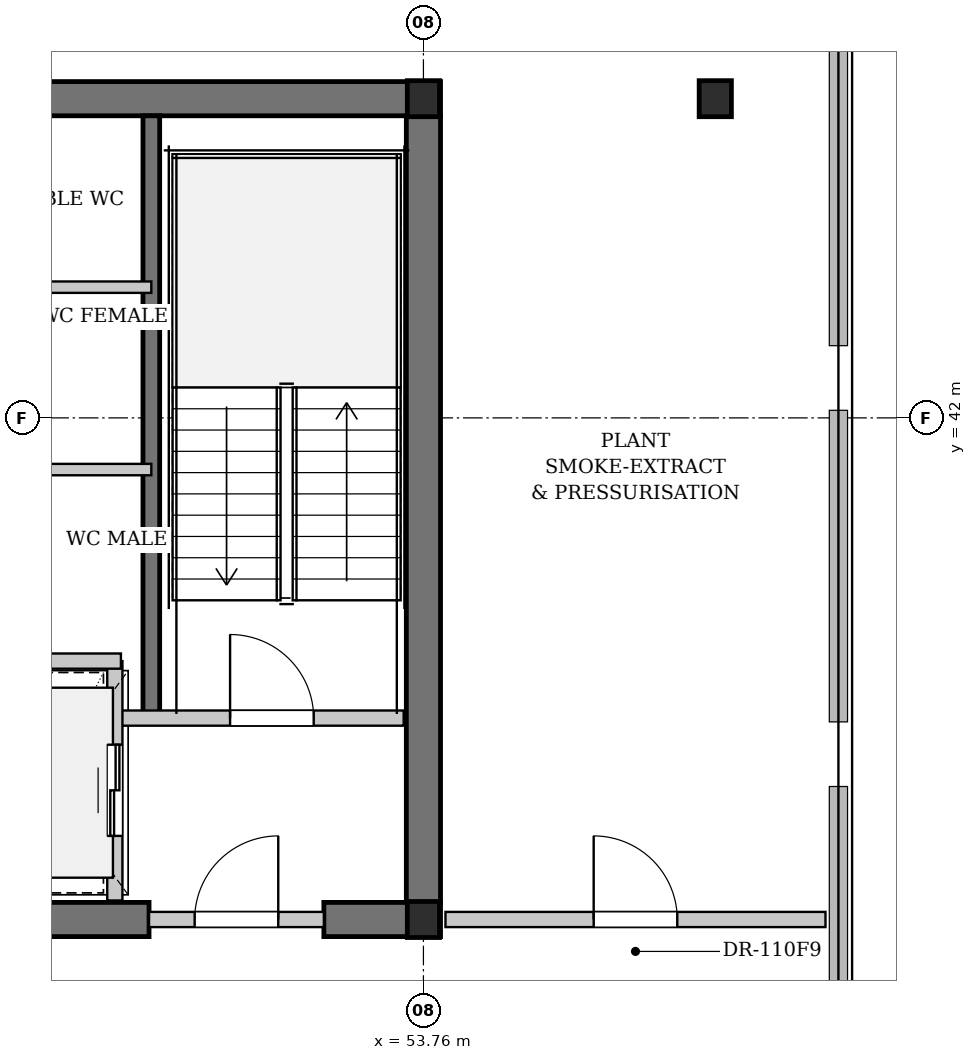
"""IFC4 building model, lengths in metres.
Left out: names, types, materials, properties, quantities, classifications, styles, units other than length and angle.
Written with IfcOpenShell. Run it as: python <this file> out.ifc"""

import sys

from ifc_helpers import new_model, si_unit, direction, frame, frame_2d, origin, origin_2d, place, context, subcontext, project, spatial, rectangle, i_section, extrude, element, fill, save


model = new_model("IFC4")
c1 = context("Model", 3, precision=1e-05, world=origin(), true_north=direction((0.0, 1.0)))
c2 = subcontext(c1, "Body", "Model", "MODEL_VIEW")
j1 = project(units=[si_unit("LENGTHUNIT", "METRE"), si_unit("PLANEANGLEUNIT", "RADIAN")], contexts=[c1])
p1 = place(None, origin())
s1 = spatial("IfcSite", under=j1, at=p1, CompositionType="ELEMENT")
p2 = place(p1, origin())
s2 = spatial("IfcBuilding", under=s1, at=p2, CompositionType="ELEMENT")
p3 = place(p2, frame((0.0, 0.0, 145.1)))
s3 = spatial("IfcBuildingStorey", under=s2, at=p3, CompositionType="ELEMENT", Elevation=145.1)
p4 = place(p3, frame((22.815, 46.2, 0.0), z_axis=(0.0, 0.0, 1.0), x_axis=(1.0, 0.0, 0.0)))
e1 = element("IfcWall", 1, at=p4, inside=s3, PredefinedType="SHEAR", context=c2, shape_type="SweptSolid", body=[
    extrude(rectangle(XDim=31.17, YDim=0.45, at=frame_2d((15.585, 0.0))), origin(), (0.0, 0.0, 1.0), 3.48),
])
p5 = place(p3, frame((42.1, 35.4, 0.0), z_axis=(0.0, 0.0, 1.0), x_axis=(1.0, 0.0, 0.0)))
e2 = element("IfcWall", 2, at=p5, inside=s3, PredefinedType="SHEAR", context=c2, shape_type="SweptSolid", body=[
    extrude(rectangle(XDim=8.05, YDim=0.45, at=frame_2d((4.025, 0.0))), origin(), (0.0, 0.0, 1.0), 3.48),
])
p6 = place(p5, frame((4.85, 0.0, 0.0)))
e3 = element("IfcOpeningElement", 3, at=p6, cuts=e2, PredefinedType="OPENING", context=c2, shape_type="SweptSolid", body=[
    extrude(rectangle(XDim=0.9, YDim=2.15, at=frame_2d((0.45, 1.075))), frame((0.0, 0.235, 0.0), z_axis=(0.0, -1.0, 0.0), x_axis=(1.0, 0.0, 0.0)), (0.0, 0.0, 1.0), 0.47),
])
p7 = place(p3, frame((52.45, 35.4, 0.0), z_axis=(0.0, 0.0, 1.0), x_axis=(1.0, 0.0, 0.0)))
e4 = element("IfcWall", 4, at=p7, inside=s3, PredefinedType="SHEAR", context=c2, shape_type="SweptSolid", body=[
    extrude(rectangle(XDim=1.535, YDim=0.45, at=frame_2d((0.768, 0.0))), origin(), (0.0, 0.0, 1.0), 3.48),
])
p8 = place(p3, frame((53.76, 35.625, 0.0), z_axis=(0.0, 0.0, 1.0), x_axis=(0.0, 1.0, 0.0)))
e5 = element("IfcWall", 5, at=p8, inside=s3, PredefinedType="SHEAR", context=c2, shape_type="SweptSolid", body=[
    extrude(rectangle(XDim=10.35, YDim=0.45, at=frame_2d((5.175, 0.0))), origin(), (0.0, 0.0, 1.0), 3.48),
])
p9 = place(p3, frame((50.18, 38.05, 0.0), z_axis=(0.0, 0.0, 1.0), x_axis=(0.0, 1.0, 0.0)))
e6 = element("IfcWall", 6, at=p9, inside=s3, PredefinedType="SHEAR", context=c2, shape_type="SweptSolid", body=[
    extrude(rectangle(XDim=7.925, YDim=0.22, at=frame_2d((3.962, 0.0))), origin(), (0.0, 0.0, 1.0), 3.48),
])
for number, where, z_axis, x_axis in (
    (7, (53.76, 35.4, 0.0), (0.0, 0.0, 1.0), (1.0, 0.0, 0.0)),
    (8, (53.76, 46.2, 0.0), (0.0, 0.0, 1.0), (1.0, 0.0, 0.0)),
    (9, (57.6, 46.2, 0.0), (0.0, 0.0, 1.0), (1.0, 0.0, 0.0)),
):
    element("IfcColumn", number, at=place(p3, frame(where, z_axis=z_axis, x_axis=x_axis)), inside=s3, PredefinedType="COLUMN", context=c2, shape_type="SweptSolid", body=[
        extrude(i_section(OverallWidth=0.424, OverallDepth=0.474, WebThickness=0.047, FlangeThickness=0.077, FilletRadius=0.015, at=origin_2d()), origin(), (0.0, 0.0, 1.0), 3.9),
    ])
p10 = place(p3, frame((49.78, 38.05, 0.0), z_axis=(0.0, 0.0, 1.0), x_axis=(1.0, 0.0, 0.0)))
e10 = element("IfcWall", 10, at=p10, inside=s3, PredefinedType="PARTITIONING", context=c2, shape_type="SweptSolid", body=[
    extrude(rectangle(XDim=3.72, YDim=0.2, at=frame_2d((1.86, 0.0))), origin(), (0.0, 0.0, 1.0), 3.48),
])
p11 = place(p10, frame((1.436, 0.0, 0.0)))
e11 = element("IfcOpeningElement", 11, at=p11, cuts=e10, PredefinedType="OPENING", context=c2, shape_type="SweptSolid", body=[
    extrude(rectangle(XDim=1.1, YDim=2.15, at=frame_2d((0.55, 1.075))), frame((0.0, 0.11, 0.0), z_axis=(0.0, -1.0, 0.0), x_axis=(1.0, 0.0, 0.0)), (0.0, 0.0, 1.0), 0.22),
])
p12 = place(p3, frame((50.15, 35.4, 0.0), z_axis=(0.0, 0.0, 1.0), x_axis=(1.0, 0.0, 0.0)))
e12 = element("IfcWall", 12, at=p12, inside=s3, PredefinedType="PARTITIONING", context=c2, shape_type="SweptSolid", body=[
    extrude(rectangle(XDim=2.3, YDim=0.2, at=frame_2d((1.15, 0.0))), origin(), (0.0, 0.0, 1.0), 2.565),
])
p13 = place(p12, frame((0.6, 0.0, 0.0)))
e13 = element("IfcOpeningElement", 13, at=p13, cuts=e12, PredefinedType="OPENING", context=c2, shape_type="SweptSolid", body=[
    extrude(rectangle(XDim=1.1, YDim=2.15, at=frame_2d((0.55, 1.075))), frame((0.0, 0.11, 0.0), z_axis=(0.0, -1.0, 0.0), x_axis=(1.0, 0.0, 0.0)), (0.0, 0.0, 1.0), 0.22),
])
p14 = place(p3, frame((49.7, 35.65, 0.0), z_axis=(0.0, 0.0, 1.0), x_axis=(0.0, 1.0, 0.0)))
e14 = element("IfcWall", 14, at=p14, inside=s3, PredefinedType="PARTITIONING", context=c2, shape_type="SweptSolid", body=[
    extrude(rectangle(XDim=3.15, YDim=0.2, at=frame_2d((1.575, 0.0))), origin(), (0.0, 0.0, 1.0), 3.48),
])
p15 = place(p14, frame((0.85, 0.0, 0.0)))
e15 = element("IfcOpeningElement", 15, at=p15, cuts=e14, PredefinedType="OPENING", context=c2, shape_type="SweptSolid", body=[
    extrude(rectangle(XDim=1.2, YDim=2.2, at=frame_2d((0.6, 1.1))), frame((0.0, 0.11, 0.0), z_axis=(0.0, -1.0, 0.0), x_axis=(1.0, 0.0, 0.0)), (0.0, 0.0, 1.0), 0.22),
])
p16 = place(p3, frame((47.92, 38.8, 0.0), z_axis=(0.0, 0.0, 1.0), x_axis=(1.0, 0.0, 0.0)))
e16 = element("IfcWall", 16, at=p16, inside=s3, PredefinedType="PARTITIONING", context=c2, shape_type="SweptSolid", body=[
    extrude(rectangle(XDim=1.86, YDim=0.2, at=frame_2d((0.93, 0.0))), origin(), (0.0, 0.0, 1.0), 3.48),
])
p17 = place(p3, frame((45.68, 43.72, 0.0), z_axis=(0.0, 0.0, 1.0), x_axis=(1.0, 0.0, 0.0)))
e17 = element("IfcWall", 17, at=p17, inside=s3, PredefinedType="PARTITIONING", context=c2, shape_type="SweptSolid", body=[
    extrude(rectangle(XDim=4.5, YDim=0.15, at=frame_2d((2.25, 0.0))), origin(), (0.0, 0.0, 1.0), 3.48),
])
p18 = place(p17, frame((0.55, 0.0, 0.0)))
e18 = element("IfcOpeningElement", 18, at=p18, cuts=e17, PredefinedType="OPENING", context=c2, shape_type="SweptSolid", body=[
    extrude(rectangle(XDim=0.95, YDim=2.15, at=frame_2d((0.475, 1.075))), frame((0.0, 0.085, 0.0), z_axis=(0.0, -1.0, 0.0), x_axis=(1.0, 0.0, 0.0)), (0.0, 0.0, 1.0), 0.17),
])
p19 = place(p3, frame((47.88, 41.32, 0.0), z_axis=(0.0, 0.0, 1.0), x_axis=(1.0, 0.0, 0.0)))
e19 = element("IfcWall", 19, at=p19, inside=s3, PredefinedType="PARTITIONING", context=c2, shape_type="SweptSolid", body=[
    extrude(rectangle(XDim=2.3, YDim=0.15, at=frame_2d((1.15, 0.0))), origin(), (0.0, 0.0, 1.0), 3.48),
])
p20 = place(p3, frame((54.05, 35.4, 0.0), z_axis=(0.0, 0.0, 1.0), x_axis=(1.0, 0.0, 0.0)))
e20 = element("IfcWall", 20, at=p20, inside=s3, PredefinedType="PARTITIONING", context=c2, shape_type="SweptSolid", body=[
    extrude(rectangle(XDim=5.0, YDim=0.2, at=frame_2d((2.5, 0.0))), origin(), (0.0, 0.0, 1.0), 3.48),
])
p21 = place(p20, frame((1.95, 0.0, 0.0)))
e21 = element("IfcOpeningElement", 21, at=p21, cuts=e20, PredefinedType="OPENING", context=c2, shape_type="SweptSolid", body=[
    extrude(rectangle(XDim=1.1, YDim=2.15, at=frame_2d((0.55, 1.075))), frame((0.0, 0.11, 0.0), z_axis=(0.0, -1.0, 0.0), x_axis=(1.0, 0.0, 0.0)), (0.0, 0.0, 1.0), 0.22),
])
p22 = place(p11, origin())
e22 = element("IfcDoor", 22, at=p22, inside=s3, OperationType="SINGLE_SWING_LEFT", PredefinedType="DOOR", context=c2, shape_type="SweptSolid", body=[
    extrude(rectangle(XDim=1.1, YDim=2.15, at=frame_2d((0.55, 1.075))), frame((0.0, 0.025, 0.0), z_axis=(0.0, -1.0, 0.0), x_axis=(1.0, 0.0, 0.0)), (0.0, 0.0, 1.0), 0.05),
])
fill(e11, e22)
p23 = place(p13, origin())
e23 = element("IfcDoor", 23, at=p23, inside=s3, OperationType="SINGLE_SWING_RIGHT", PredefinedType="DOOR", context=c2, shape_type="SweptSolid", body=[
    extrude(rectangle(XDim=1.1, YDim=2.15, at=frame_2d((0.55, 1.075))), frame((0.0, 0.025, 0.0), z_axis=(0.0, -1.0, 0.0), x_axis=(1.0, 0.0, 0.0)), (0.0, 0.0, 1.0), 0.05),
])
fill(e13, e23)
p24 = place(p15, origin())
e24 = element("IfcDoor", 24, at=p24, inside=s3, OperationType="DOUBLE_DOOR_SLIDING", PredefinedType="DOOR", context=c2, shape_type="SweptSolid", body=[
    extrude(rectangle(XDim=1.2, YDim=2.2, at=frame_2d((0.6, 1.1))), frame((0.0, 0.025, 0.0), z_axis=(0.0, -1.0, 0.0), x_axis=(1.0, 0.0, 0.0)), (0.0, 0.0, 1.0), 0.05),
])
fill(e15, e24)
p25 = place(p21, origin())
e25 = element("IfcDoor", 25, at=p25, inside=s3, OperationType="SINGLE_SWING_LEFT", PredefinedType="DOOR", context=c2, shape_type="SweptSolid", body=[
    extrude(rectangle(XDim=1.1, YDim=2.15, at=frame_2d((0.55, 1.075))), frame((0.0, 0.025, 0.0), z_axis=(0.0, -1.0, 0.0), x_axis=(1.0, 0.0, 0.0)), (0.0, 0.0, 1.0), 0.05),
])
fill(e21, e25)
save(model, sys.argv[1])
